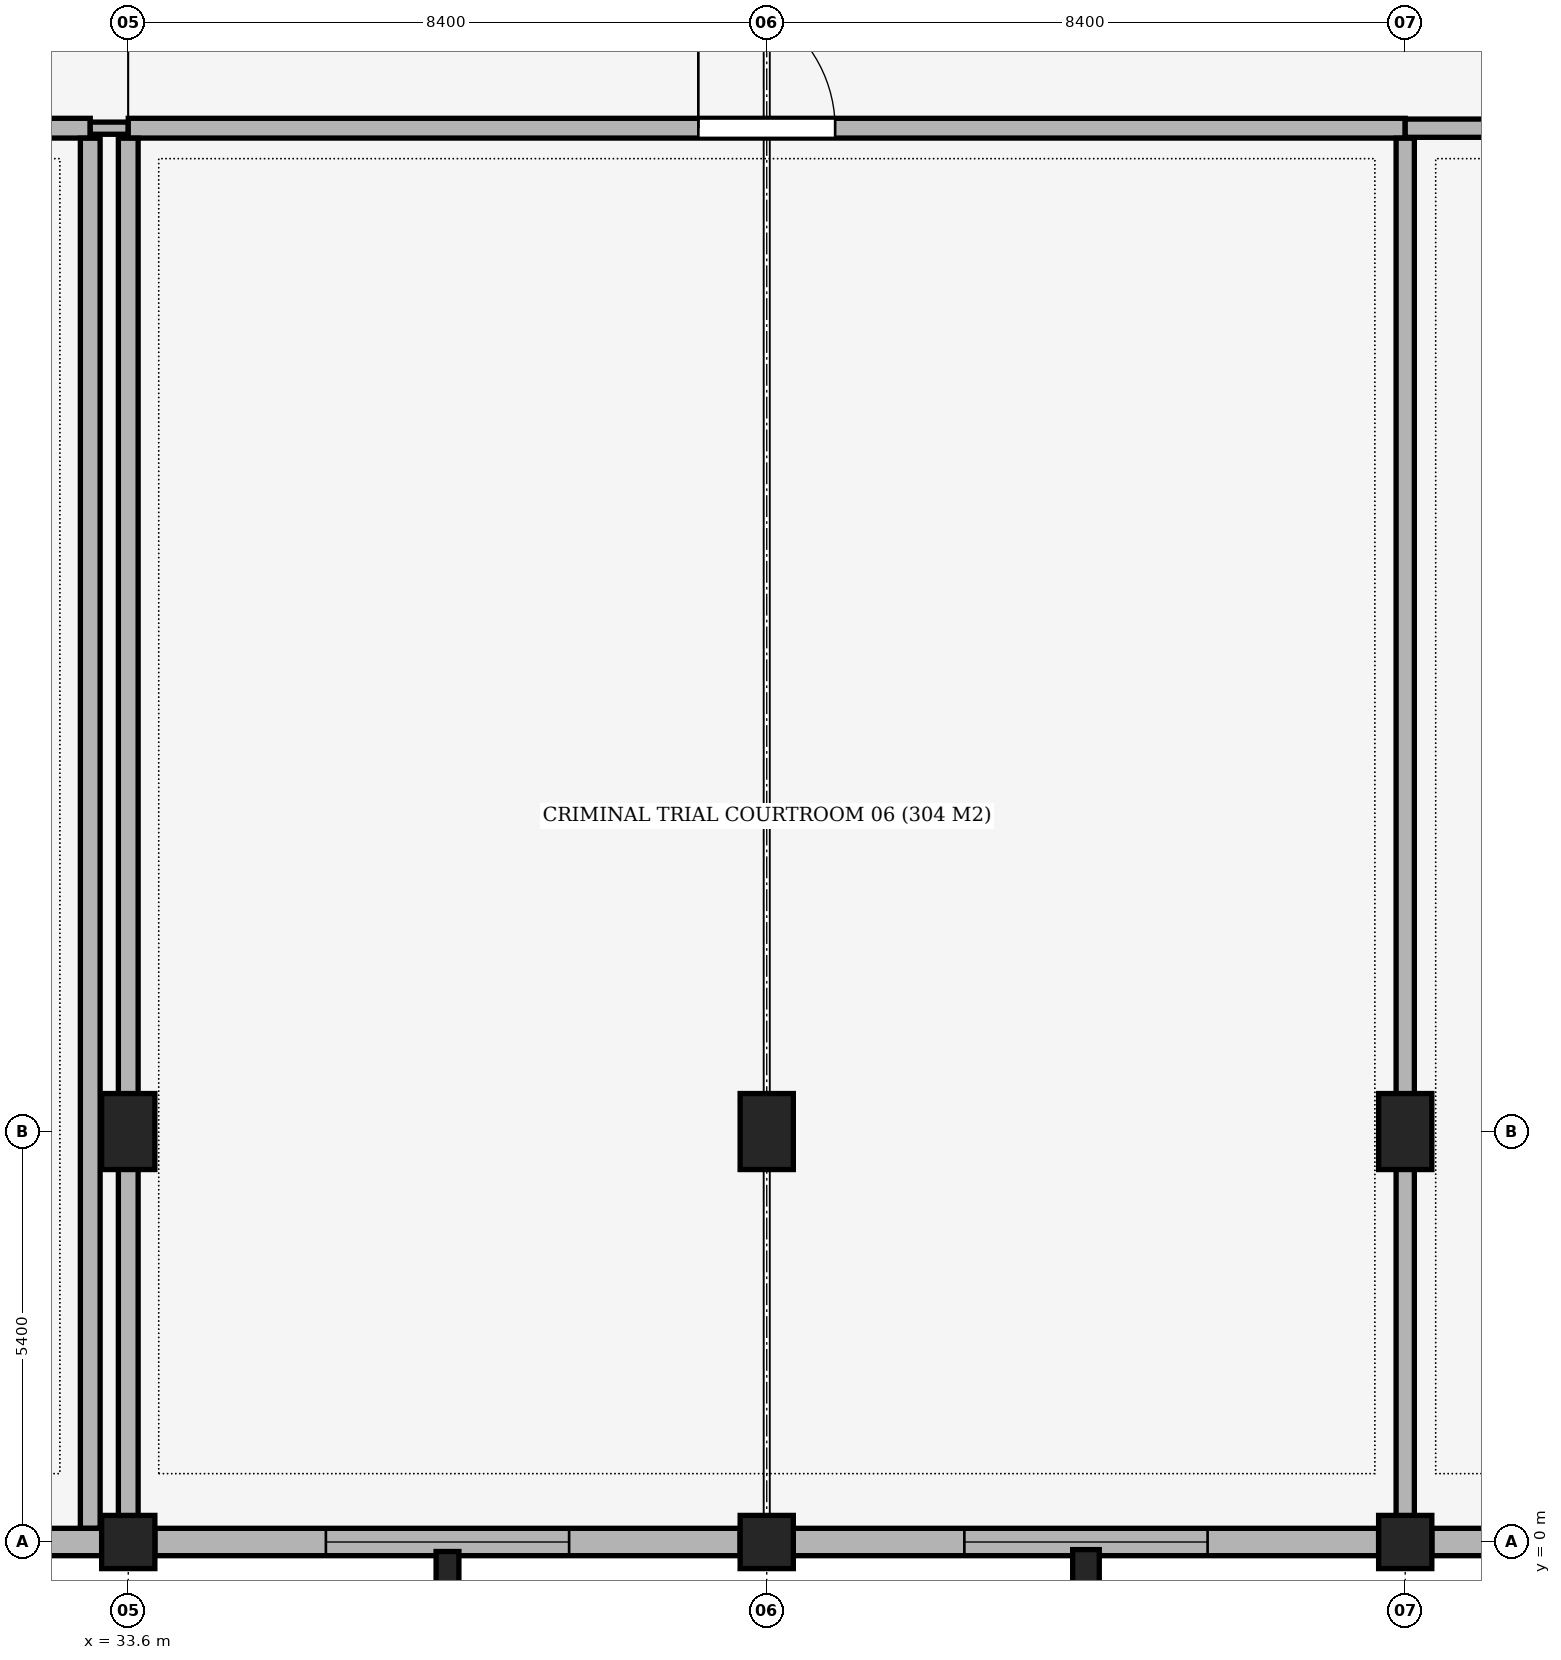
"""IFC4 building model, lengths in metres.
Left out: names, types, materials, properties, quantities, classifications, styles, units other than length and angle.
Written with IfcOpenShell. Run it as: python <this file> out.ifc"""

import sys

from ifc_helpers import new_model, si_unit, direction, frame, frame_2d, origin, origin_2d, place, context, subcontext, project, spatial, rectangle, extrude, element, fill, save


model = new_model("IFC4")
c1 = context("Model", 3, precision=1e-05, world=origin(), true_north=direction((0.0, 1.0)))
c2 = subcontext(c1, "Body", "Model", "MODEL_VIEW")
j1 = project(units=[si_unit("LENGTHUNIT", "METRE"), si_unit("PLANEANGLEUNIT", "RADIAN")], contexts=[c1])
p1 = place(None, origin())
s1 = spatial("IfcSite", under=j1, at=p1, CompositionType="ELEMENT")
p2 = place(p1, origin())
s2 = spatial("IfcBuilding", under=s1, at=p2, CompositionType="ELEMENT")
p3 = place(p2, frame((0.0, 0.0, 5.1)))
s3 = spatial("IfcBuildingStorey", under=s2, at=p3, CompositionType="ELEMENT", Elevation=5.1)
p4 = place(p3, frame((33.6, 0.0, 0.0), z_axis=(0.0, 0.0, 1.0), x_axis=(1.0, 0.0, 0.0)))
e1 = element("IfcColumn", 1, at=p4, inside=s3, PredefinedType="COLUMN", context=c2, shape_type="SweptSolid", body=[
    extrude(rectangle(XDim=0.7, YDim=0.7, at=origin_2d()), origin(), (0.0, 0.0, 1.0), 5.1),
])
p5 = place(p3, frame((33.6, 5.4, 0.0), z_axis=(0.0, 0.0, 1.0), x_axis=(1.0, 0.0, 0.0)))
e2 = element("IfcColumn", 2, at=p5, inside=s3, PredefinedType="COLUMN", context=c2, shape_type="SweptSolid", body=[
    extrude(rectangle(XDim=0.7, YDim=1.0, at=origin_2d()), origin(), (0.0, 0.0, 1.0), 5.1),
])
p6 = place(p3, frame((42.0, 0.0, 0.0), z_axis=(0.0, 0.0, 1.0), x_axis=(1.0, 0.0, 0.0)))
e3 = element("IfcColumn", 3, at=p6, inside=s3, PredefinedType="COLUMN", context=c2, shape_type="SweptSolid", body=[
    extrude(rectangle(XDim=0.7, YDim=0.7, at=origin_2d()), origin(), (0.0, 0.0, 1.0), 5.1),
])
p7 = place(p3, frame((42.0, 5.4, 0.0), z_axis=(0.0, 0.0, 1.0), x_axis=(1.0, 0.0, 0.0)))
e4 = element("IfcColumn", 4, at=p7, inside=s3, PredefinedType="COLUMN", context=c2, shape_type="SweptSolid", body=[
    extrude(rectangle(XDim=0.7, YDim=1.0, at=origin_2d()), origin(), (0.0, 0.0, 1.0), 5.1),
])
p8 = place(p3, frame((50.4, 0.0, 0.0), z_axis=(0.0, 0.0, 1.0), x_axis=(1.0, 0.0, 0.0)))
e5 = element("IfcColumn", 5, at=p8, inside=s3, PredefinedType="COLUMN", context=c2, shape_type="SweptSolid", body=[
    extrude(rectangle(XDim=0.7, YDim=0.7, at=origin_2d()), origin(), (0.0, 0.0, 1.0), 5.1),
])
p9 = place(p3, frame((50.4, 5.4, 0.0), z_axis=(0.0, 0.0, 1.0), x_axis=(1.0, 0.0, 0.0)))
e6 = element("IfcColumn", 6, at=p9, inside=s3, PredefinedType="COLUMN", context=c2, shape_type="SweptSolid", body=[
    extrude(rectangle(XDim=0.7, YDim=1.0, at=origin_2d()), origin(), (0.0, 0.0, 1.0), 5.1),
])
p10 = place(p3, frame((37.8, -0.35, 0.0), z_axis=(0.0, 0.0, 1.0), x_axis=(1.0, 0.0, 0.0)))
e7 = element("IfcColumn", 7, at=p10, inside=s3, PredefinedType="PILASTER", context=c2, shape_type="SweptSolid", body=[
    extrude(rectangle(XDim=0.3, YDim=0.45, at=origin_2d()), origin(), (0.0, 0.0, 1.0), 5.1),
])
p11 = place(p3, frame((46.2, -0.35, 0.0), z_axis=(0.0, 0.0, 1.0), x_axis=(1.0, 0.0, 0.0)))
e8 = element("IfcColumn", 8, at=p11, inside=s3, PredefinedType="PILASTER", context=c2, shape_type="SweptSolid", body=[
    extrude(rectangle(XDim=0.35, YDim=0.5, at=origin_2d()), origin(), (0.0, 0.0, 1.0), 5.1),
])
p12 = place(p3, frame((58.45, 0.0, 0.0), z_axis=(0.0, 0.0, 1.0), x_axis=(-1.0, 0.0, 0.0)))
e9 = element("IfcWall", 9, at=p12, inside=s3, PredefinedType="SOLIDWALL", context=c2, shape_type="SweptSolid", body=[
    extrude(rectangle(XDim=7.7, YDim=0.36, at=frame_2d((3.85, 0.0))), origin(), (0.0, 0.0, 1.0), 4.07),
])
p13 = place(p12, frame((2.25, 0.0, 0.75)))
e10 = element("IfcOpeningElement", 10, at=p13, cuts=e9, PredefinedType="OPENING", context=c2, shape_type="SweptSolid", body=[
    extrude(rectangle(XDim=3.2, YDim=2.6, at=frame_2d((1.6, 1.3))), frame((0.0, 0.195, 0.0), z_axis=(0.0, -1.0, 0.0), x_axis=(1.0, 0.0, 0.0)), (0.0, 0.0, 1.0), 0.39),
])
p14 = place(p3, frame((50.05, 0.0, 0.0), z_axis=(0.0, 0.0, 1.0), x_axis=(-1.0, 0.0, 0.0)))
e11 = element("IfcWall", 11, at=p14, inside=s3, PredefinedType="SOLIDWALL", context=c2, shape_type="SweptSolid", body=[
    extrude(rectangle(XDim=7.7, YDim=0.36, at=frame_2d((3.85, 0.0))), origin(), (0.0, 0.0, 1.0), 4.07),
])
p15 = place(p14, frame((2.25, 0.0, 0.75)))
e12 = element("IfcOpeningElement", 12, at=p15, cuts=e11, PredefinedType="OPENING", context=c2, shape_type="SweptSolid", body=[
    extrude(rectangle(XDim=3.2, YDim=2.6, at=frame_2d((1.6, 1.3))), frame((0.0, 0.195, 0.0), z_axis=(0.0, -1.0, 0.0), x_axis=(1.0, 0.0, 0.0)), (0.0, 0.0, 1.0), 0.39),
])
p16 = place(p3, frame((41.65, 0.0, 0.0), z_axis=(0.0, 0.0, 1.0), x_axis=(-1.0, 0.0, 0.0)))
e13 = element("IfcWall", 13, at=p16, inside=s3, PredefinedType="SOLIDWALL", context=c2, shape_type="SweptSolid", body=[
    extrude(rectangle(XDim=7.7, YDim=0.36, at=frame_2d((3.85, 0.0))), origin(), (0.0, 0.0, 1.0), 4.07),
])
p17 = place(p16, frame((2.25, 0.0, 0.75)))
e14 = element("IfcOpeningElement", 14, at=p17, cuts=e13, PredefinedType="OPENING", context=c2, shape_type="SweptSolid", body=[
    extrude(rectangle(XDim=3.2, YDim=2.6, at=frame_2d((1.6, 1.3))), frame((0.0, 0.195, 0.0), z_axis=(0.0, -1.0, 0.0), x_axis=(1.0, 0.0, 0.0)), (0.0, 0.0, 1.0), 0.39),
])
p18 = place(p3, frame((33.25, 0.0, 0.0), z_axis=(0.0, 0.0, 1.0), x_axis=(-1.0, 0.0, 0.0)))
e15 = element("IfcWall", 15, at=p18, inside=s3, PredefinedType="SOLIDWALL", context=c2, shape_type="SweptSolid", body=[
    extrude(rectangle(XDim=7.7, YDim=0.36, at=frame_2d((3.85, 0.0))), origin(), (0.0, 0.0, 1.0), 4.07),
])
p19 = place(p18, frame((1.367, 0.0, 0.85)))
e16 = element("IfcOpeningElement", 16, at=p19, cuts=e15, PredefinedType="OPENING", context=c2, shape_type="SweptSolid", body=[
    extrude(rectangle(XDim=1.8, YDim=2.4, at=frame_2d((0.9, 1.2))), frame((0.0, 0.195, 0.0), z_axis=(0.0, -1.0, 0.0), x_axis=(1.0, 0.0, 0.0)), (0.0, 0.0, 1.0), 0.39),
])
p20 = place(p18, frame((4.533, 0.0, 0.85)))
e17 = element("IfcOpeningElement", 17, at=p20, cuts=e15, PredefinedType="OPENING", context=c2, shape_type="SweptSolid", body=[
    extrude(rectangle(XDim=1.8, YDim=2.4, at=frame_2d((0.9, 1.2))), frame((0.0, 0.195, 0.0), z_axis=(0.0, -1.0, 0.0), x_axis=(1.0, 0.0, 0.0)), (0.0, 0.0, 1.0), 0.39),
])
p21 = place(p3, frame((16.8, 18.6, 0.0), z_axis=(0.0, 0.0, 1.0), x_axis=(1.0, 0.0, 0.0)))
e18 = element("IfcWall", 18, at=p21, inside=s3, PredefinedType="PARTITIONING", context=c2, shape_type="SweptSolid", body=[
    extrude(rectangle(XDim=16.3, YDim=0.26, at=frame_2d((8.15, 0.0))), origin(), (0.0, 0.0, 1.0), 3.67),
])
p22 = place(p21, frame((7.25, 0.0, 0.0)))
e19 = element("IfcOpeningElement", 19, at=p22, cuts=e18, PredefinedType="OPENING", context=c2, shape_type="SweptSolid", body=[
    extrude(rectangle(XDim=1.8, YDim=2.4, at=frame_2d((0.9, 1.2))), frame((0.0, 0.145, 0.0), z_axis=(0.0, -1.0, 0.0), x_axis=(1.0, 0.0, 0.0)), (0.0, 0.0, 1.0), 0.29),
])
p23 = place(p3, frame((33.1, 18.6, 0.0), z_axis=(0.0, 0.0, 1.0), x_axis=(1.0, 0.0, 0.0)))
e20 = element("IfcWall", 20, at=p23, inside=s3, PredefinedType="PARTITIONING", context=c2, shape_type="SweptSolid", body=[
    extrude(rectangle(XDim=0.5, YDim=0.16, at=frame_2d((0.25, 0.0))), origin(), (0.0, 0.0, 1.0), 3.67),
])
p24 = place(p3, frame((33.6, 18.6, 0.0), z_axis=(0.0, 0.0, 1.0), x_axis=(1.0, 0.0, 0.0)))
e21 = element("IfcWall", 21, at=p24, inside=s3, PredefinedType="PARTITIONING", context=c2, shape_type="SweptSolid", body=[
    extrude(rectangle(XDim=16.8, YDim=0.26, at=frame_2d((8.4, 0.0))), origin(), (0.0, 0.0, 1.0), 3.67),
])
p25 = place(p24, frame((7.5, 0.0, 0.0)))
e22 = element("IfcOpeningElement", 22, at=p25, cuts=e21, PredefinedType="OPENING", context=c2, shape_type="SweptSolid", body=[
    extrude(rectangle(XDim=1.8, YDim=2.4, at=frame_2d((0.9, 1.2))), frame((0.0, 0.145, 0.0), z_axis=(0.0, -1.0, 0.0), x_axis=(1.0, 0.0, 0.0)), (0.0, 0.0, 1.0), 0.29),
])
p26 = place(p3, frame((50.4, 18.6, 0.0), z_axis=(0.0, 0.0, 1.0), x_axis=(1.0, 0.0, 0.0)))
e23 = element("IfcWall", 23, at=p26, inside=s3, PredefinedType="PARTITIONING", context=c2, shape_type="SweptSolid", body=[
    extrude(rectangle(XDim=16.8, YDim=0.24, at=frame_2d((8.4, 0.0))), origin(), (0.0, 0.0, 1.0), 3.67),
])
p27 = place(p26, frame((7.5, 0.0, 0.0)))
e24 = element("IfcOpeningElement", 24, at=p27, cuts=e23, PredefinedType="OPENING", context=c2, shape_type="SweptSolid", body=[
    extrude(rectangle(XDim=1.8, YDim=2.4, at=frame_2d((0.9, 1.2))), frame((0.0, 0.135, 0.0), z_axis=(0.0, -1.0, 0.0), x_axis=(1.0, 0.0, 0.0)), (0.0, 0.0, 1.0), 0.27),
])
p28 = place(p3, frame((33.1, 0.182, 0.0), z_axis=(0.0, 0.0, 1.0), x_axis=(0.0, 1.0, 0.0)))
e25 = element("IfcWall", 25, at=p28, inside=s3, PredefinedType="PARTITIONING", context=c2, shape_type="SweptSolid", body=[
    extrude(rectangle(XDim=18.286, YDim=0.26, at=frame_2d((9.143, 0.0))), origin(), (0.0, 0.0, 1.0), 4.07),
])
p29 = place(p3, frame((33.6, 0.065, 0.0), z_axis=(0.0, 0.0, 1.0), x_axis=(0.0, 1.0, 0.0)))
e26 = element("IfcWall", 26, at=p29, inside=s3, PredefinedType="PARTITIONING", context=c2, shape_type="SweptSolid", body=[
    extrude(rectangle(XDim=18.403, YDim=0.26, at=frame_2d((9.202, 0.0))), origin(), (0.0, 0.0, 1.0), 3.67),
])
p30 = place(p3, frame((50.4, 0.065, 0.0), z_axis=(0.0, 0.0, 1.0), x_axis=(0.0, 1.0, 0.0)))
e27 = element("IfcWall", 27, at=p30, inside=s3, PredefinedType="PARTITIONING", context=c2, shape_type="SweptSolid", body=[
    extrude(rectangle(XDim=18.403, YDim=0.24, at=frame_2d((9.202, 0.0))), origin(), (0.0, 0.0, 1.0), 3.67),
])
p31 = place(p15, origin())
e28 = element("IfcWindow", 28, at=p31, inside=s3, PartitioningType="SINGLE_PANEL", PredefinedType="WINDOW", context=c2, shape_type="SweptSolid", body=[
    extrude(rectangle(XDim=3.2, YDim=2.6, at=frame_2d((1.6, 1.3))), frame((0.0, 0.03, 0.0), z_axis=(0.0, -1.0, 0.0), x_axis=(1.0, 0.0, 0.0)), (0.0, 0.0, 1.0), 0.06),
])
fill(e12, e28)
p32 = place(p17, origin())
e29 = element("IfcWindow", 29, at=p32, inside=s3, PartitioningType="SINGLE_PANEL", PredefinedType="WINDOW", context=c2, shape_type="SweptSolid", body=[
    extrude(rectangle(XDim=3.2, YDim=2.6, at=frame_2d((1.6, 1.3))), frame((0.0, 0.03, 0.0), z_axis=(0.0, -1.0, 0.0), x_axis=(1.0, 0.0, 0.0)), (0.0, 0.0, 1.0), 0.06),
])
fill(e14, e29)
p33 = place(p25, origin())
e30 = element("IfcDoor", 30, at=p33, inside=s3, OperationType="SINGLE_SWING_LEFT", PredefinedType="DOOR", context=c2, shape_type="SweptSolid", body=[
    extrude(rectangle(XDim=1.8, YDim=2.4, at=frame_2d((0.9, 1.2))), frame((0.0, 0.025, 0.0), z_axis=(0.0, -1.0, 0.0), x_axis=(1.0, 0.0, 0.0)), (0.0, 0.0, 1.0), 0.05),
])
fill(e22, e30)
save(model, sys.argv[1])
